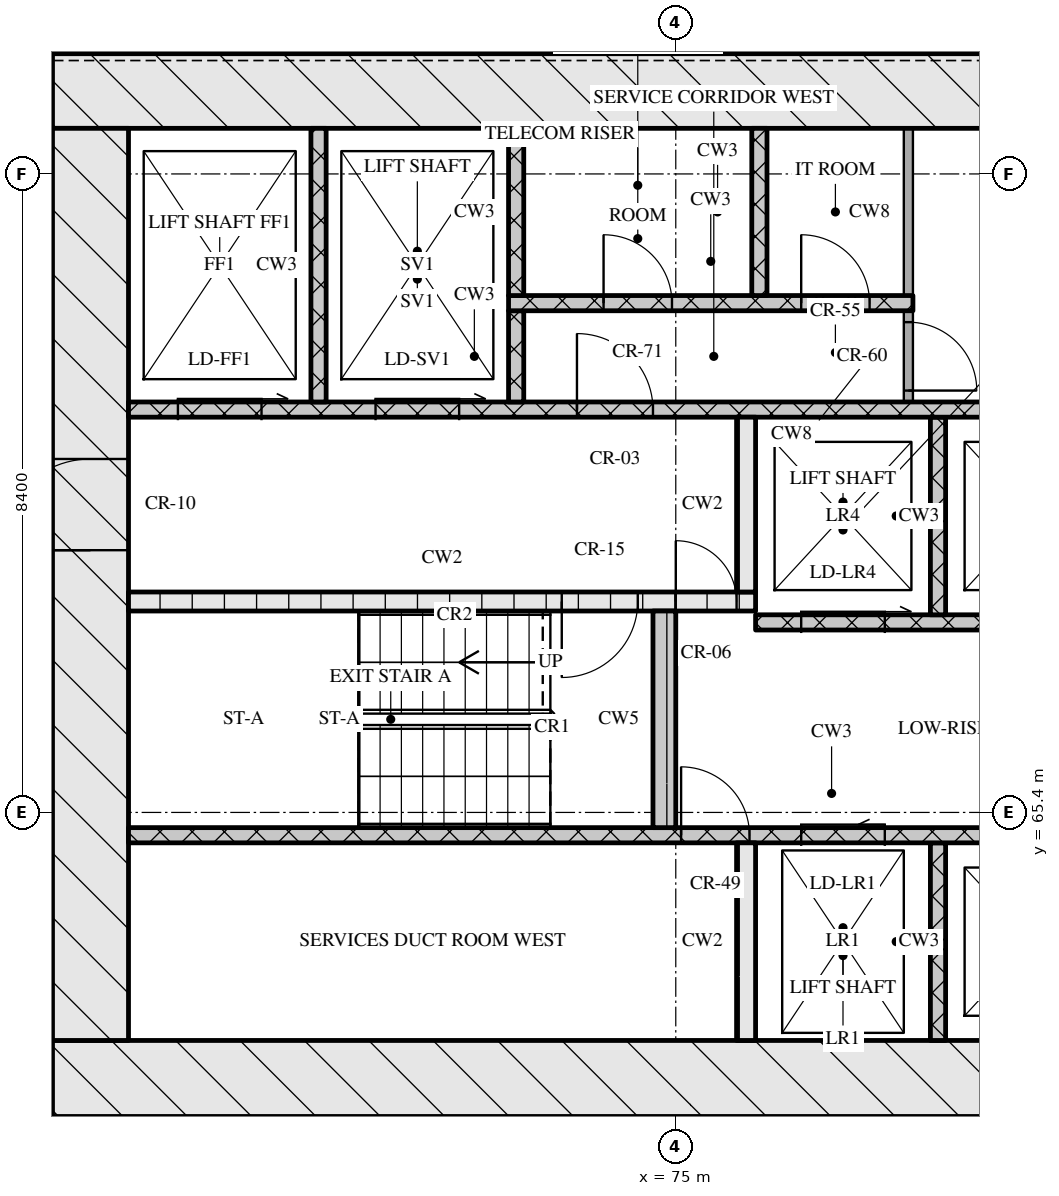
"""IFC4 building model, lengths in metres.
Left out: names, types, materials, properties, quantities, classifications, styles, units other than length and angle.
Written with IfcOpenShell. Run it as: python <this file> out.ifc"""

import sys

from ifc_helpers import new_model, si_unit, direction, frame, frame_2d, origin, place, context, subcontext, project, spatial, rectangle, extrude, element, fill, save


model = new_model("IFC4")
c1 = context("Model", 3, precision=1e-05, world=origin(), true_north=direction((0.0, 1.0)))
c2 = subcontext(c1, "Body", "Model", "MODEL_VIEW")
j1 = project(units=[si_unit("LENGTHUNIT", "METRE"), si_unit("PLANEANGLEUNIT", "RADIAN")], contexts=[c1])
p1 = place(None, origin())
s1 = spatial("IfcSite", under=j1, at=p1, CompositionType="ELEMENT")
p2 = place(p1, origin())
s2 = spatial("IfcBuilding", under=s1, at=p2, CompositionType="ELEMENT")
p3 = place(p2, frame((0.0, 0.0, 134.85)))
s3 = spatial("IfcBuildingStorey", under=s2, at=p3, CompositionType="ELEMENT", Elevation=134.85)
p4 = place(p3, frame((66.8, 61.9, 0.0), z_axis=(0.0, 0.0, 1.0), x_axis=(1.0, 0.0, 0.0)))
e1 = element("IfcWall", 1, at=p4, inside=s3, PredefinedType="SOLIDWALL", context=c2, shape_type="SweptSolid", body=[
    extrude(rectangle(XDim=41.6, YDim=1.0, at=frame_2d((20.8, 0.0))), origin(), (0.0, 0.0, 1.0), 3.32),
])
p5 = place(p4, frame((21.15, 0.0, 0.0)))
e2 = element("IfcOpeningElement", 2, at=p5, cuts=e1, PredefinedType="OPENING", context=c2, shape_type="SweptSolid", body=[
    extrude(rectangle(XDim=1.8, YDim=2.1, at=frame_2d((0.9, 1.05))), frame((0.0, 0.51, 0.0), z_axis=(0.0, -1.0, 0.0), x_axis=(1.0, 0.0, 0.0)), (0.0, 0.0, 1.0), 1.02),
])
p6 = place(p3, frame((66.8, 74.9, 0.0), z_axis=(0.0, 0.0, 1.0), x_axis=(1.0, 0.0, 0.0)))
e3 = element("IfcWall", 3, at=p6, inside=s3, PredefinedType="SOLIDWALL", context=c2, shape_type="SweptSolid", body=[
    extrude(rectangle(XDim=41.6, YDim=1.0, at=frame_2d((20.8, 0.0))), origin(), (0.0, 0.0, 1.0), 3.32),
])
p7 = place(p3, frame((67.3, 62.4, 0.0), z_axis=(0.0, 0.0, 1.0), x_axis=(0.0, 1.0, 0.0)))
e4 = element("IfcWall", 4, at=p7, inside=s3, PredefinedType="SOLIDWALL", context=c2, shape_type="SweptSolid", body=[
    extrude(rectangle(XDim=12.0, YDim=1.0, at=frame_2d((6.0, 0.0))), origin(), (0.0, 0.0, 1.0), 3.32),
])
p8 = place(p7, frame((6.45, 0.0, 0.0)))
e5 = element("IfcOpeningElement", 5, at=p8, cuts=e4, PredefinedType="OPENING", context=c2, shape_type="SweptSolid", body=[
    extrude(rectangle(XDim=1.2, YDim=2.1, at=frame_2d((0.6, 1.05))), frame((0.0, 0.51, 0.0), z_axis=(0.0, -1.0, 0.0), x_axis=(1.0, 0.0, 0.0)), (0.0, 0.0, 1.0), 1.02),
])
p9 = place(p3, frame((75.925, 62.4, 0.0), z_axis=(0.0, 0.0, 1.0), x_axis=(0.0, 1.0, 0.0)))
e6 = element("IfcWall", 6, at=p9, inside=s3, PredefinedType="SOLIDWALL", context=c2, shape_type="SweptSolid", body=[
    extrude(rectangle(XDim=2.6, YDim=0.25, at=frame_2d((1.3, 0.0))), origin(), (0.0, 0.0, 1.0), 3.32),
])
p10 = place(p3, frame((78.45, 62.4, 0.0), z_axis=(0.0, 0.0, 1.0), x_axis=(0.0, 1.0, 0.0)))
e7 = element("IfcWall", 7, at=p10, inside=s3, PredefinedType="SOLIDWALL", context=c2, shape_type="SweptSolid", body=[
    extrude(rectangle(XDim=2.6, YDim=0.2, at=frame_2d((1.3, 0.0))), origin(), (0.0, 0.0, 1.0), 3.32),
])
p11 = place(p3, frame((67.8, 65.1, 0.0), z_axis=(0.0, 0.0, 1.0), x_axis=(1.0, 0.0, 0.0)))
e8 = element("IfcWall", 8, at=p11, inside=s3, PredefinedType="SOLIDWALL", context=c2, shape_type="SweptSolid", body=[
    extrude(rectangle(XDim=18.5, YDim=0.2, at=frame_2d((9.25, 0.0))), origin(), (0.0, 0.0, 1.0), 3.32),
])
p12 = place(p11, frame((7.27, 0.0, 0.0)))
e9 = element("IfcOpeningElement", 9, at=p12, cuts=e8, PredefinedType="OPENING", context=c2, shape_type="SweptSolid", body=[
    extrude(rectangle(XDim=0.9, YDim=2.1, at=frame_2d((0.45, 1.05))), frame((0.0, 0.11, 0.0), z_axis=(0.0, -1.0, 0.0), x_axis=(1.0, 0.0, 0.0)), (0.0, 0.0, 1.0), 0.22),
])
p13 = place(p11, frame((8.85, 0.0, 0.0)))
e10 = element("IfcOpeningElement", 10, at=p13, cuts=e8, PredefinedType="OPENING", context=c2, shape_type="SweptSolid", body=[
    extrude(rectangle(XDim=1.1, YDim=2.1, at=frame_2d((0.55, 1.05))), frame((0.0, 0.11, 0.0), z_axis=(0.0, -1.0, 0.0), x_axis=(1.0, 0.0, 0.0)), (0.0, 0.0, 1.0), 0.22),
])
p14 = place(p11, frame((11.35, 0.0, 0.0)))
e11 = element("IfcOpeningElement", 11, at=p14, cuts=e8, PredefinedType="OPENING", context=c2, shape_type="SweptSolid", body=[
    extrude(rectangle(XDim=1.1, YDim=2.1, at=frame_2d((0.55, 1.05))), frame((0.0, 0.11, 0.0), z_axis=(0.0, -1.0, 0.0), x_axis=(1.0, 0.0, 0.0)), (0.0, 0.0, 1.0), 0.22),
])
p15 = place(p11, frame((13.85, 0.0, 0.0)))
e12 = element("IfcOpeningElement", 12, at=p15, cuts=e8, PredefinedType="OPENING", context=c2, shape_type="SweptSolid", body=[
    extrude(rectangle(XDim=1.1, YDim=2.1, at=frame_2d((0.55, 1.05))), frame((0.0, 0.11, 0.0), z_axis=(0.0, -1.0, 0.0), x_axis=(1.0, 0.0, 0.0)), (0.0, 0.0, 1.0), 0.22),
])
p16 = place(p11, frame((16.7, 0.0, 0.0)))
e13 = element("IfcOpeningElement", 13, at=p16, cuts=e8, PredefinedType="OPENING", context=c2, shape_type="SweptSolid", body=[
    extrude(rectangle(XDim=0.9, YDim=2.1, at=frame_2d((0.45, 1.05))), frame((0.0, 0.11, 0.0), z_axis=(0.0, -1.0, 0.0), x_axis=(1.0, 0.0, 0.0)), (0.0, 0.0, 1.0), 0.22),
])
p17 = place(p3, frame((74.85, 65.2, 0.0), z_axis=(0.0, 0.0, 1.0), x_axis=(0.0, 1.0, 0.0)))
e14 = element("IfcWall", 14, at=p17, inside=s3, PredefinedType="SOLIDWALL", context=c2, shape_type="SweptSolid", body=[
    extrude(rectangle(XDim=2.85, YDim=0.3, at=frame_2d((1.425, 0.0))), origin(), (0.0, 0.0, 1.0), 3.32),
])
p18 = place(p3, frame((76.05, 67.9, 0.0), z_axis=(0.0, 0.0, 1.0), x_axis=(1.0, 0.0, 0.0)))
e15 = element("IfcWall", 15, at=p18, inside=s3, PredefinedType="SOLIDWALL", context=c2, shape_type="SweptSolid", body=[
    extrude(rectangle(XDim=23.1, YDim=0.2, at=frame_2d((11.55, 0.0))), origin(), (0.0, 0.0, 1.0), 3.32),
])
p19 = place(p18, frame((0.6, 0.0, 0.0)))
e16 = element("IfcOpeningElement", 16, at=p19, cuts=e15, PredefinedType="OPENING", context=c2, shape_type="SweptSolid", body=[
    extrude(rectangle(XDim=1.1, YDim=2.1, at=frame_2d((0.55, 1.05))), frame((0.0, 0.11, 0.0), z_axis=(0.0, -1.0, 0.0), x_axis=(1.0, 0.0, 0.0)), (0.0, 0.0, 1.0), 0.22),
])
p20 = place(p18, frame((3.1, 0.0, 0.0)))
e17 = element("IfcOpeningElement", 17, at=p20, cuts=e15, PredefinedType="OPENING", context=c2, shape_type="SweptSolid", body=[
    extrude(rectangle(XDim=1.1, YDim=2.1, at=frame_2d((0.55, 1.05))), frame((0.0, 0.11, 0.0), z_axis=(0.0, -1.0, 0.0), x_axis=(1.0, 0.0, 0.0)), (0.0, 0.0, 1.0), 0.22),
])
p21 = place(p18, frame((5.6, 0.0, 0.0)))
e18 = element("IfcOpeningElement", 18, at=p21, cuts=e15, PredefinedType="OPENING", context=c2, shape_type="SweptSolid", body=[
    extrude(rectangle(XDim=1.1, YDim=2.1, at=frame_2d((0.55, 1.05))), frame((0.0, 0.11, 0.0), z_axis=(0.0, -1.0, 0.0), x_axis=(1.0, 0.0, 0.0)), (0.0, 0.0, 1.0), 0.22),
])
p22 = place(p18, frame((8.45, 0.0, 0.0)))
e19 = element("IfcOpeningElement", 19, at=p22, cuts=e15, PredefinedType="OPENING", context=c2, shape_type="SweptSolid", body=[
    extrude(rectangle(XDim=0.9, YDim=2.1, at=frame_2d((0.45, 1.05))), frame((0.0, 0.11, 0.0), z_axis=(0.0, -1.0, 0.0), x_axis=(1.0, 0.0, 0.0)), (0.0, 0.0, 1.0), 0.22),
])
p23 = place(p18, frame((10.91, 0.0, 0.0)))
e20 = element("IfcOpeningElement", 20, at=p23, cuts=e15, PredefinedType="OPENING", context=c2, shape_type="SweptSolid", body=[
    extrude(rectangle(XDim=0.9, YDim=2.1, at=frame_2d((0.45, 1.05))), frame((0.0, 0.11, 0.0), z_axis=(0.0, -1.0, 0.0), x_axis=(1.0, 0.0, 0.0)), (0.0, 0.0, 1.0), 0.22),
])
p24 = place(p18, frame((13.55, 0.0, 0.0)))
e21 = element("IfcOpeningElement", 21, at=p24, cuts=e15, PredefinedType="OPENING", context=c2, shape_type="SweptSolid", body=[
    extrude(rectangle(XDim=1.0, YDim=2.1, at=frame_2d((0.5, 1.05))), frame((0.0, 0.11, 0.0), z_axis=(0.0, -1.0, 0.0), x_axis=(1.0, 0.0, 0.0)), (0.0, 0.0, 1.0), 0.22),
])
p25 = place(p3, frame((78.45, 68.0, 0.0), z_axis=(0.0, 0.0, 1.0), x_axis=(0.0, 1.0, 0.0)))
e22 = element("IfcWall", 22, at=p25, inside=s3, PredefinedType="SOLIDWALL", context=c2, shape_type="SweptSolid", body=[
    extrude(rectangle(XDim=2.6, YDim=0.2, at=frame_2d((1.3, 0.0))), origin(), (0.0, 0.0, 1.0), 3.32),
])
p26 = place(p3, frame((67.8, 68.175, 0.0), z_axis=(0.0, 0.0, 1.0), x_axis=(1.0, 0.0, 0.0)))
e23 = element("IfcWall", 23, at=p26, inside=s3, PredefinedType="SOLIDWALL", context=c2, shape_type="SweptSolid", body=[
    extrude(rectangle(XDim=8.25, YDim=0.25, at=frame_2d((4.125, 0.0))), origin(), (0.0, 0.0, 1.0), 3.32),
])
p27 = place(p26, frame((5.7, 0.0, 0.0)))
e24 = element("IfcOpeningElement", 24, at=p27, cuts=e23, PredefinedType="OPENING", context=c2, shape_type="SweptSolid", body=[
    extrude(rectangle(XDim=1.0, YDim=2.1, at=frame_2d((0.5, 1.05))), frame((0.0, 0.135, 0.0), z_axis=(0.0, -1.0, 0.0), x_axis=(1.0, 0.0, 0.0)), (0.0, 0.0, 1.0), 0.27),
])
p28 = place(p26, frame((7.2, 0.0, 0.0)))
e25 = element("IfcOpeningElement", 25, at=p28, cuts=e23, PredefinedType="OPENING", context=c2, shape_type="SweptSolid", body=[
    extrude(rectangle(XDim=0.8, YDim=2.1, at=frame_2d((0.4, 1.05))), frame((0.0, 0.135, 0.0), z_axis=(0.0, -1.0, 0.0), x_axis=(1.0, 0.0, 0.0)), (0.0, 0.0, 1.0), 0.27),
])
p29 = place(p3, frame((75.925, 68.3, 0.0), z_axis=(0.0, 0.0, 1.0), x_axis=(0.0, 1.0, 0.0)))
e26 = element("IfcWall", 26, at=p29, inside=s3, PredefinedType="SOLIDWALL", context=c2, shape_type="SweptSolid", body=[
    extrude(rectangle(XDim=2.3, YDim=0.25, at=frame_2d((1.15, 0.0))), origin(), (0.0, 0.0, 1.0), 3.32),
])
p30 = place(p3, frame((67.8, 70.7, 0.0), z_axis=(0.0, 0.0, 1.0), x_axis=(1.0, 0.0, 0.0)))
e27 = element("IfcWall", 27, at=p30, inside=s3, PredefinedType="SOLIDWALL", context=c2, shape_type="SweptSolid", body=[
    extrude(rectangle(XDim=39.6, YDim=0.2, at=frame_2d((19.8, 0.0))), origin(), (0.0, 0.0, 1.0), 3.32),
])
p31 = place(p30, frame((0.65, 0.0, 0.0)))
e28 = element("IfcOpeningElement", 28, at=p31, cuts=e27, PredefinedType="OPENING", context=c2, shape_type="SweptSolid", body=[
    extrude(rectangle(XDim=1.1, YDim=2.1, at=frame_2d((0.55, 1.05))), frame((0.0, 0.11, 0.0), z_axis=(0.0, -1.0, 0.0), x_axis=(1.0, 0.0, 0.0)), (0.0, 0.0, 1.0), 0.22),
])
p32 = place(p30, frame((3.25, 0.0, 0.0)))
e29 = element("IfcOpeningElement", 29, at=p32, cuts=e27, PredefinedType="OPENING", context=c2, shape_type="SweptSolid", body=[
    extrude(rectangle(XDim=1.1, YDim=2.1, at=frame_2d((0.55, 1.05))), frame((0.0, 0.11, 0.0), z_axis=(0.0, -1.0, 0.0), x_axis=(1.0, 0.0, 0.0)), (0.0, 0.0, 1.0), 0.22),
])
p33 = place(p30, frame((5.9, 0.0, 0.0)))
e30 = element("IfcOpeningElement", 30, at=p33, cuts=e27, PredefinedType="OPENING", context=c2, shape_type="SweptSolid", body=[
    extrude(rectangle(XDim=1.0, YDim=2.1, at=frame_2d((0.5, 1.05))), frame((0.0, 0.11, 0.0), z_axis=(0.0, -1.0, 0.0), x_axis=(1.0, 0.0, 0.0)), (0.0, 0.0, 1.0), 0.22),
])
p34 = place(p30, frame((21.7, 0.0, 0.0)))
e31 = element("IfcOpeningElement", 31, at=p34, cuts=e27, PredefinedType="OPENING", context=c2, shape_type="SweptSolid", body=[
    extrude(rectangle(XDim=1.0, YDim=2.1, at=frame_2d((0.5, 1.05))), frame((0.0, 0.11, 0.0), z_axis=(0.0, -1.0, 0.0), x_axis=(1.0, 0.0, 0.0)), (0.0, 0.0, 1.0), 0.22),
])
p35 = place(p30, frame((32.7, 0.0, 0.0)))
e32 = element("IfcOpeningElement", 32, at=p35, cuts=e27, PredefinedType="OPENING", context=c2, shape_type="SweptSolid", body=[
    extrude(rectangle(XDim=1.0, YDim=2.1, at=frame_2d((0.5, 1.05))), frame((0.0, 0.11, 0.0), z_axis=(0.0, -1.0, 0.0), x_axis=(1.0, 0.0, 0.0)), (0.0, 0.0, 1.0), 0.22),
])
p36 = place(p30, frame((35.25, 0.0, 0.0)))
e33 = element("IfcOpeningElement", 33, at=p36, cuts=e27, PredefinedType="OPENING", context=c2, shape_type="SweptSolid", body=[
    extrude(rectangle(XDim=1.1, YDim=2.1, at=frame_2d((0.55, 1.05))), frame((0.0, 0.11, 0.0), z_axis=(0.0, -1.0, 0.0), x_axis=(1.0, 0.0, 0.0)), (0.0, 0.0, 1.0), 0.22),
])
p37 = place(p30, frame((37.85, 0.0, 0.0)))
e34 = element("IfcOpeningElement", 34, at=p37, cuts=e27, PredefinedType="OPENING", context=c2, shape_type="SweptSolid", body=[
    extrude(rectangle(XDim=1.1, YDim=2.1, at=frame_2d((0.55, 1.05))), frame((0.0, 0.11, 0.0), z_axis=(0.0, -1.0, 0.0), x_axis=(1.0, 0.0, 0.0)), (0.0, 0.0, 1.0), 0.22),
])
p38 = place(p3, frame((70.3, 70.8, 0.0), z_axis=(0.0, 0.0, 1.0), x_axis=(0.0, 1.0, 0.0)))
e35 = element("IfcWall", 35, at=p38, inside=s3, PredefinedType="SOLIDWALL", context=c2, shape_type="SweptSolid", body=[
    extrude(rectangle(XDim=3.6, YDim=0.2, at=frame_2d((1.8, 0.0))), origin(), (0.0, 0.0, 1.0), 3.32),
])
p39 = place(p3, frame((72.9, 70.8, 0.0), z_axis=(0.0, 0.0, 1.0), x_axis=(0.0, 1.0, 0.0)))
e36 = element("IfcWall", 36, at=p39, inside=s3, PredefinedType="SOLIDWALL", context=c2, shape_type="SweptSolid", body=[
    extrude(rectangle(XDim=1.2, YDim=0.2, at=frame_2d((0.6, 0.0))), origin(), (0.0, 0.0, 1.0), 3.32),
])
p40 = place(p3, frame((78.06, 70.8, 0.0), z_axis=(0.0, 0.0, 1.0), x_axis=(0.0, 1.0, 0.0)))
e37 = element("IfcWall", 37, at=p40, inside=s3, PredefinedType="PARTITIONING", context=c2, shape_type="SweptSolid", body=[
    extrude(rectangle(XDim=1.2, YDim=0.12, at=frame_2d((0.6, 0.0))), origin(), (0.0, 0.0, 1.0), 3.32),
])
p41 = place(p40, frame((0.15, 0.0, 0.0)))
e38 = element("IfcOpeningElement", 38, at=p41, cuts=e37, PredefinedType="OPENING", context=c2, shape_type="SweptSolid", body=[
    extrude(rectangle(XDim=0.9, YDim=2.1, at=frame_2d((0.45, 1.05))), frame((0.0, 0.07, 0.0), z_axis=(0.0, -1.0, 0.0), x_axis=(1.0, 0.0, 0.0)), (0.0, 0.0, 1.0), 0.14),
])
p42 = place(p3, frame((72.8, 72.1, 0.0), z_axis=(0.0, 0.0, 1.0), x_axis=(1.0, 0.0, 0.0)))
e39 = element("IfcWall", 39, at=p42, inside=s3, PredefinedType="SOLIDWALL", context=c2, shape_type="SweptSolid", body=[
    extrude(rectangle(XDim=5.32, YDim=0.2, at=frame_2d((2.66, 0.0))), origin(), (0.0, 0.0, 1.0), 3.32),
])
p43 = place(p42, frame((1.25, 0.0, 0.0)))
e40 = element("IfcOpeningElement", 40, at=p43, cuts=e39, PredefinedType="OPENING", context=c2, shape_type="SweptSolid", body=[
    extrude(rectangle(XDim=0.9, YDim=2.1, at=frame_2d((0.45, 1.05))), frame((0.0, 0.11, 0.0), z_axis=(0.0, -1.0, 0.0), x_axis=(1.0, 0.0, 0.0)), (0.0, 0.0, 1.0), 0.22),
])
p44 = place(p42, frame((3.85, 0.0, 0.0)))
e41 = element("IfcOpeningElement", 41, at=p44, cuts=e39, PredefinedType="OPENING", context=c2, shape_type="SweptSolid", body=[
    extrude(rectangle(XDim=0.9, YDim=2.1, at=frame_2d((0.45, 1.05))), frame((0.0, 0.11, 0.0), z_axis=(0.0, -1.0, 0.0), x_axis=(1.0, 0.0, 0.0)), (0.0, 0.0, 1.0), 0.22),
])
for number, where, z_axis, x_axis in (
    (42, (72.9, 72.2, 0.0), (0.0, 0.0, 1.0), (0.0, 1.0, 0.0)),
    (43, (76.1, 72.2, 0.0), (0.0, 0.0, 1.0), (0.0, 1.0, 0.0)),
):
    element("IfcWall", number, at=place(p3, frame(where, z_axis=z_axis, x_axis=x_axis)), inside=s3, PredefinedType="SOLIDWALL", context=c2, shape_type="SweptSolid", body=[
        extrude(rectangle(XDim=2.2, YDim=0.2, at=frame_2d((1.1, 0.0))), origin(), (0.0, 0.0, 1.0), 3.32),
    ])
p45 = place(p3, frame((78.06, 72.2, 0.0), z_axis=(0.0, 0.0, 1.0), x_axis=(0.0, 1.0, 0.0)))
e44 = element("IfcWall", 44, at=p45, inside=s3, PredefinedType="PARTITIONING", context=c2, shape_type="SweptSolid", body=[
    extrude(rectangle(XDim=2.2, YDim=0.12, at=frame_2d((1.1, 0.0))), origin(), (0.0, 0.0, 1.0), 3.32),
])
p46 = place(p12, origin())
e45 = element("IfcDoor", 45, at=p46, inside=s3, OperationType="SINGLE_SWING_LEFT", PredefinedType="DOOR", context=c2, shape_type="SweptSolid", body=[
    extrude(rectangle(XDim=0.9, YDim=2.1, at=frame_2d((0.45, 1.05))), frame((0.0, 0.025, 0.0), z_axis=(0.0, -1.0, 0.0), x_axis=(1.0, 0.0, 0.0)), (0.0, 0.0, 1.0), 0.05),
])
fill(e9, e45)
p47 = place(p13, origin())
e46 = element("IfcDoor", 46, at=p47, inside=s3, OperationType="SLIDING_TO_LEFT", PredefinedType="DOOR", context=c2, shape_type="SweptSolid", body=[
    extrude(rectangle(XDim=1.1, YDim=2.1, at=frame_2d((0.55, 1.05))), frame((0.0, 0.025, 0.0), z_axis=(0.0, -1.0, 0.0), x_axis=(1.0, 0.0, 0.0)), (0.0, 0.0, 1.0), 0.05),
])
fill(e10, e46)
p48 = place(p19, origin())
e47 = element("IfcDoor", 47, at=p48, inside=s3, OperationType="SLIDING_TO_RIGHT", PredefinedType="DOOR", context=c2, shape_type="SweptSolid", body=[
    extrude(rectangle(XDim=1.1, YDim=2.1, at=frame_2d((0.55, 1.05))), frame((0.0, 0.025, 0.0), z_axis=(0.0, -1.0, 0.0), x_axis=(1.0, 0.0, 0.0)), (0.0, 0.0, 1.0), 0.05),
])
fill(e16, e47)
p49 = place(p27, origin())
e48 = element("IfcDoor", 48, at=p49, inside=s3, OperationType="SINGLE_SWING_RIGHT", PredefinedType="DOOR", context=c2, shape_type="SweptSolid", body=[
    extrude(rectangle(XDim=1.0, YDim=2.1, at=frame_2d((0.5, 1.05))), frame((0.0, 0.025, 0.0), z_axis=(0.0, -1.0, 0.0), x_axis=(1.0, 0.0, 0.0)), (0.0, 0.0, 1.0), 0.05),
])
fill(e24, e48)
p50 = place(p28, origin())
e49 = element("IfcDoor", 49, at=p50, inside=s3, OperationType="SINGLE_SWING_LEFT", PredefinedType="DOOR", context=c2, shape_type="SweptSolid", body=[
    extrude(rectangle(XDim=0.8, YDim=2.1, at=frame_2d((0.4, 1.05))), frame((0.0, 0.025, 0.0), z_axis=(0.0, -1.0, 0.0), x_axis=(1.0, 0.0, 0.0)), (0.0, 0.0, 1.0), 0.05),
])
fill(e25, e49)
p51 = place(p8, origin())
e50 = element("IfcDoor", 50, at=p51, inside=s3, OperationType="SINGLE_SWING_LEFT", PredefinedType="DOOR", context=c2, shape_type="SweptSolid", body=[
    extrude(rectangle(XDim=1.2, YDim=2.1, at=frame_2d((0.6, 1.05))), frame((0.0, 0.025, 0.0), z_axis=(0.0, -1.0, 0.0), x_axis=(1.0, 0.0, 0.0)), (0.0, 0.0, 1.0), 0.05),
])
fill(e5, e50)
p52 = place(p31, origin())
e51 = element("IfcDoor", 51, at=p52, inside=s3, OperationType="SLIDING_TO_RIGHT", PredefinedType="DOOR", context=c2, shape_type="SweptSolid", body=[
    extrude(rectangle(XDim=1.1, YDim=2.1, at=frame_2d((0.55, 1.05))), frame((0.0, 0.025, 0.0), z_axis=(0.0, -1.0, 0.0), x_axis=(1.0, 0.0, 0.0)), (0.0, 0.0, 1.0), 0.05),
])
fill(e28, e51)
p53 = place(p32, origin())
e52 = element("IfcDoor", 52, at=p53, inside=s3, OperationType="SLIDING_TO_RIGHT", PredefinedType="DOOR", context=c2, shape_type="SweptSolid", body=[
    extrude(rectangle(XDim=1.1, YDim=2.1, at=frame_2d((0.55, 1.05))), frame((0.0, 0.025, 0.0), z_axis=(0.0, -1.0, 0.0), x_axis=(1.0, 0.0, 0.0)), (0.0, 0.0, 1.0), 0.05),
])
fill(e29, e52)
p54 = place(p33, origin())
e53 = element("IfcDoor", 53, at=p54, inside=s3, OperationType="SINGLE_SWING_LEFT", PredefinedType="DOOR", context=c2, shape_type="SweptSolid", body=[
    extrude(rectangle(XDim=1.0, YDim=2.1, at=frame_2d((0.5, 1.05))), frame((0.0, 0.025, 0.0), z_axis=(0.0, -1.0, 0.0), x_axis=(1.0, 0.0, 0.0)), (0.0, 0.0, 1.0), 0.05),
])
fill(e30, e53)
p55 = place(p41, origin())
e54 = element("IfcDoor", 54, at=p55, inside=s3, OperationType="SINGLE_SWING_RIGHT", PredefinedType="DOOR", context=c2, shape_type="SweptSolid", body=[
    extrude(rectangle(XDim=0.9, YDim=2.1, at=frame_2d((0.45, 1.05))), frame((0.0, 0.025, 0.0), z_axis=(0.0, -1.0, 0.0), x_axis=(1.0, 0.0, 0.0)), (0.0, 0.0, 1.0), 0.05),
])
fill(e38, e54)
p56 = place(p43, origin())
e55 = element("IfcDoor", 55, at=p56, inside=s3, OperationType="SINGLE_SWING_LEFT", PredefinedType="DOOR", context=c2, shape_type="SweptSolid", body=[
    extrude(rectangle(XDim=0.9, YDim=2.1, at=frame_2d((0.45, 1.05))), frame((0.0, 0.025, 0.0), z_axis=(0.0, -1.0, 0.0), x_axis=(1.0, 0.0, 0.0)), (0.0, 0.0, 1.0), 0.05),
])
fill(e40, e55)
p57 = place(p44, origin())
e56 = element("IfcDoor", 56, at=p57, inside=s3, OperationType="SINGLE_SWING_LEFT", PredefinedType="DOOR", context=c2, shape_type="SweptSolid", body=[
    extrude(rectangle(XDim=0.9, YDim=2.1, at=frame_2d((0.45, 1.05))), frame((0.0, 0.025, 0.0), z_axis=(0.0, -1.0, 0.0), x_axis=(1.0, 0.0, 0.0)), (0.0, 0.0, 1.0), 0.05),
])
fill(e41, e56)
save(model, sys.argv[1])
